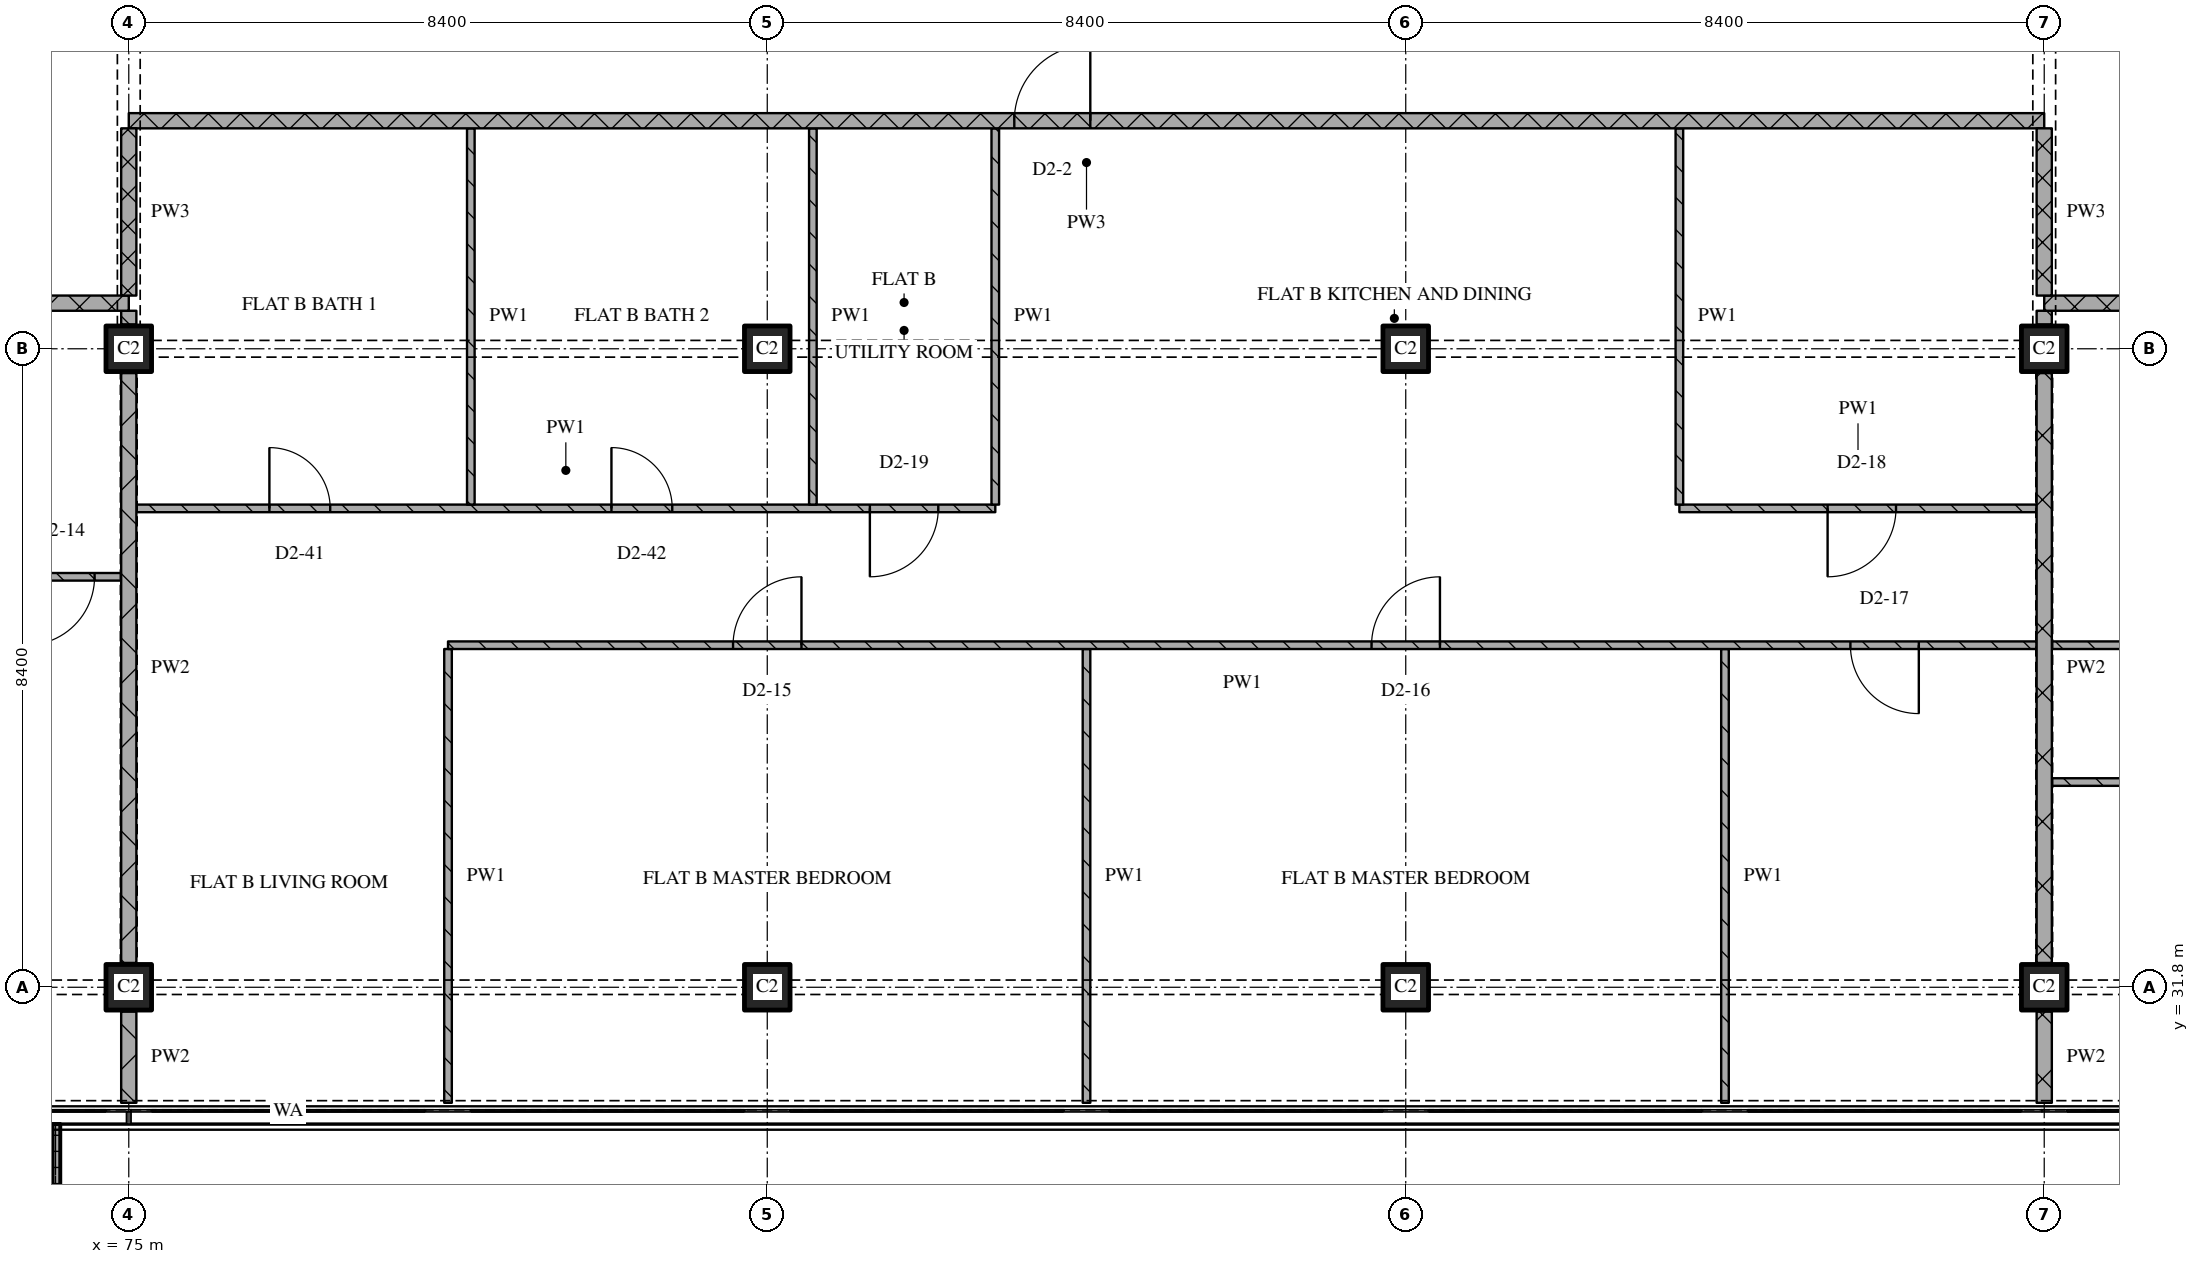
"""IFC4 building model, lengths in metres.
Left out: names, types, materials, properties, quantities, classifications, styles, units other than length and angle.
Written with IfcOpenShell. Run it as: python <this file> out.ifc"""

import sys

from ifc_helpers import new_model, si_unit, direction, frame, frame_2d, origin, origin_2d, place, context, subcontext, project, spatial, polyline, rectangle, outline, extrude, element, fill, save


model = new_model("IFC4")
c1 = context("Model", 3, precision=1e-05, world=origin(), true_north=direction((0.0, 1.0)))
c2 = subcontext(c1, "Body", "Model", "MODEL_VIEW")
j1 = project(units=[si_unit("LENGTHUNIT", "METRE"), si_unit("PLANEANGLEUNIT", "RADIAN")], contexts=[c1])
p1 = place(None, origin())
s1 = spatial("IfcSite", under=j1, at=p1, CompositionType="ELEMENT")
p2 = place(p1, origin())
s2 = spatial("IfcBuilding", under=s1, at=p2, CompositionType="ELEMENT")
p3 = place(p2, frame((0.0, 0.0, 219.9)))
s3 = spatial("IfcBuildingStorey", under=s2, at=p3, CompositionType="ELEMENT", Elevation=219.9)
for number, where, z_axis, x_axis in (
    (1, (75.0, 31.8, 0.0), (0.0, 0.0, 1.0), (1.0, 0.0, 0.0)),
    (2, (75.0, 40.2, 0.0), (0.0, 0.0, 1.0), (1.0, 0.0, 0.0)),
    (3, (83.4, 31.8, 0.0), (0.0, 0.0, 1.0), (1.0, 0.0, 0.0)),
    (4, (83.4, 40.2, 0.0), (0.0, 0.0, 1.0), (1.0, 0.0, 0.0)),
    (5, (91.8, 31.8, 0.0), (0.0, 0.0, 1.0), (1.0, 0.0, 0.0)),
    (6, (91.8, 40.2, 0.0), (0.0, 0.0, 1.0), (1.0, 0.0, 0.0)),
    (7, (100.2, 31.8, 0.0), (0.0, 0.0, 1.0), (1.0, 0.0, 0.0)),
    (8, (100.2, 40.2, 0.0), (0.0, 0.0, 1.0), (1.0, 0.0, 0.0)),
):
    element("IfcColumn", number, at=place(p3, frame(where, z_axis=z_axis, x_axis=x_axis)), inside=s3, PredefinedType="COLUMN", context=c2, shape_type="SweptSolid", body=[
        extrude(rectangle(XDim=0.6, YDim=0.6, at=origin_2d()), origin(), (0.0, 0.0, 1.0), 3.6),
    ])
p4 = place(p3, origin())
e9 = element("IfcWall", 9, at=p4, inside=s3, PredefinedType="SOLIDWALL", context=c2, shape_type="SweptSolid", body=[
    extrude(outline(polyline([(71.7, 30.0), (71.8, 30.0), (71.8, 28.5), (74.0, 28.5), (74.0, 30.0), (74.1, 30.0), (74.1, 28.4), (71.7, 28.4), (71.7, 30.0)])), origin(), (0.0, 0.0, 1.0), 1.0),
])
p5 = place(p3, frame((100.3, 34.5, 0.0), z_axis=(0.0, 0.0, 1.0), x_axis=(1.0, 0.0, 0.0)))
e10 = element("IfcWall", 10, at=p5, inside=s3, PredefinedType="PARTITIONING", context=c2, shape_type="SweptSolid", body=[
    extrude(rectangle(XDim=8.3, YDim=0.1, at=frame_2d((4.15, 0.0))), origin(), (0.0, 0.0, 1.0), 3.32),
])
p6 = place(p3, frame((64.2, 37.2, 0.0), z_axis=(0.0, 0.0, 1.0), x_axis=(1.0, 0.0, 0.0)))
e11 = element("IfcWall", 11, at=p6, inside=s3, PredefinedType="PARTITIONING", context=c2, shape_type="SweptSolid", body=[
    extrude(rectangle(XDim=10.7, YDim=0.1, at=frame_2d((5.35, 0.0))), origin(), (0.0, 0.0, 1.0), 3.32),
])
p7 = place(p6, frame((6.35, 0.0, 0.0)))
e12 = element("IfcOpeningElement", 12, at=p7, cuts=e11, PredefinedType="OPENING", context=c2, shape_type="SweptSolid", body=[
    extrude(rectangle(XDim=0.8, YDim=2.1, at=frame_2d((0.4, 1.05))), frame((0.0, 0.06, 0.0), z_axis=(0.0, -1.0, 0.0), x_axis=(1.0, 0.0, 0.0)), (0.0, 0.0, 1.0), 0.12),
])
p8 = place(p6, frame((9.45, 0.0, 0.0)))
e13 = element("IfcOpeningElement", 13, at=p8, cuts=e11, PredefinedType="OPENING", context=c2, shape_type="SweptSolid", body=[
    extrude(rectangle(XDim=0.9, YDim=2.1, at=frame_2d((0.45, 1.05))), frame((0.0, 0.06, 0.0), z_axis=(0.0, -1.0, 0.0), x_axis=(1.0, 0.0, 0.0)), (0.0, 0.0, 1.0), 0.12),
])
p9 = place(p3, frame((75.1, 38.1, 0.0), z_axis=(0.0, 0.0, 1.0), x_axis=(1.0, 0.0, 0.0)))
e14 = element("IfcWall", 14, at=p9, inside=s3, PredefinedType="PARTITIONING", context=c2, shape_type="SweptSolid", body=[
    extrude(rectangle(XDim=11.3, YDim=0.1, at=frame_2d((5.65, 0.0))), origin(), (0.0, 0.0, 1.0), 3.32),
])
p10 = place(p9, frame((1.75, 0.0, 0.0)))
e15 = element("IfcOpeningElement", 15, at=p10, cuts=e14, PredefinedType="OPENING", context=c2, shape_type="SweptSolid", body=[
    extrude(rectangle(XDim=0.8, YDim=2.1, at=frame_2d((0.4, 1.05))), frame((0.0, 0.06, 0.0), z_axis=(0.0, -1.0, 0.0), x_axis=(1.0, 0.0, 0.0)), (0.0, 0.0, 1.0), 0.12),
])
p11 = place(p9, frame((6.25, 0.0, 0.0)))
e16 = element("IfcOpeningElement", 16, at=p11, cuts=e14, PredefinedType="OPENING", context=c2, shape_type="SweptSolid", body=[
    extrude(rectangle(XDim=0.8, YDim=2.1, at=frame_2d((0.4, 1.05))), frame((0.0, 0.06, 0.0), z_axis=(0.0, -1.0, 0.0), x_axis=(1.0, 0.0, 0.0)), (0.0, 0.0, 1.0), 0.12),
])
p12 = place(p9, frame((9.65, 0.0, 0.0)))
e17 = element("IfcOpeningElement", 17, at=p12, cuts=e14, PredefinedType="OPENING", context=c2, shape_type="SweptSolid", body=[
    extrude(rectangle(XDim=0.9, YDim=2.1, at=frame_2d((0.45, 1.05))), frame((0.0, 0.06, 0.0), z_axis=(0.0, -1.0, 0.0), x_axis=(1.0, 0.0, 0.0)), (0.0, 0.0, 1.0), 0.12),
])
p13 = place(p3, frame((95.4, 38.1, 0.0), z_axis=(0.0, 0.0, 1.0), x_axis=(1.0, 0.0, 0.0)))
e18 = element("IfcWall", 18, at=p13, inside=s3, PredefinedType="PARTITIONING", context=c2, shape_type="SweptSolid", body=[
    extrude(rectangle(XDim=4.7, YDim=0.1, at=frame_2d((2.35, 0.0))), origin(), (0.0, 0.0, 1.0), 3.32),
])
p14 = place(p13, frame((1.95, 0.0, 0.0)))
e19 = element("IfcOpeningElement", 19, at=p14, cuts=e18, PredefinedType="OPENING", context=c2, shape_type="SweptSolid", body=[
    extrude(rectangle(XDim=0.9, YDim=2.1, at=frame_2d((0.45, 1.05))), frame((0.0, 0.06, 0.0), z_axis=(0.0, -1.0, 0.0), x_axis=(1.0, 0.0, 0.0)), (0.0, 0.0, 1.0), 0.12),
])
p15 = place(p3, frame((75.0, 40.8, 0.0), z_axis=(0.0, 0.0, 1.0), x_axis=(-1.0, 0.0, 0.0)))
e20 = element("IfcWall", 20, at=p15, inside=s3, PredefinedType="PARTITIONING", context=c2, shape_type="SweptSolid", body=[
    extrude(rectangle(XDim=24.38, YDim=0.2, at=frame_2d((12.19, 0.0))), origin(), (0.0, 0.0, 1.0), 3.32),
])
p16 = place(p15, frame((11.05, 0.0, 0.0)))
e21 = element("IfcOpeningElement", 21, at=p16, cuts=e20, PredefinedType="OPENING", context=c2, shape_type="SweptSolid", body=[
    extrude(rectangle(XDim=1.0, YDim=2.1, at=frame_2d((0.5, 1.05))), frame((0.0, 0.11, 0.0), z_axis=(0.0, -1.0, 0.0), x_axis=(1.0, 0.0, 0.0)), (0.0, 0.0, 1.0), 0.22),
])
p17 = place(p3, frame((124.58, 40.8, 0.0), z_axis=(0.0, 0.0, 1.0), x_axis=(-1.0, 0.0, 0.0)))
e22 = element("IfcWall", 22, at=p17, inside=s3, PredefinedType="PARTITIONING", context=c2, shape_type="SweptSolid", body=[
    extrude(rectangle(XDim=24.38, YDim=0.2, at=frame_2d((12.19, 0.0))), origin(), (0.0, 0.0, 1.0), 3.32),
])
p18 = place(p17, frame((14.43, 0.0, 0.0)))
e23 = element("IfcOpeningElement", 23, at=p18, cuts=e22, PredefinedType="OPENING", context=c2, shape_type="SweptSolid", body=[
    extrude(rectangle(XDim=1.0, YDim=2.1, at=frame_2d((0.5, 1.05))), frame((0.0, 0.11, 0.0), z_axis=(0.0, -1.0, 0.0), x_axis=(1.0, 0.0, 0.0)), (0.0, 0.0, 1.0), 0.22),
])
p19 = place(p3, frame((100.2, 43.2, 0.0), z_axis=(0.0, 0.0, 1.0), x_axis=(-1.0, 0.0, 0.0)))
e24 = element("IfcWall", 24, at=p19, inside=s3, PredefinedType="PARTITIONING", context=c2, shape_type="SweptSolid", body=[
    extrude(rectangle(XDim=25.2, YDim=0.2, at=frame_2d((12.6, 0.0))), origin(), (0.0, 0.0, 1.0), 3.32),
])
p20 = place(p19, frame((12.55, 0.0, 0.0)))
e25 = element("IfcOpeningElement", 25, at=p20, cuts=e24, PredefinedType="OPENING", context=c2, shape_type="SweptSolid", body=[
    extrude(rectangle(XDim=1.0, YDim=2.1, at=frame_2d((0.5, 1.05))), frame((0.0, 0.11, 0.0), z_axis=(0.0, -1.0, 0.0), x_axis=(1.0, 0.0, 0.0)), (0.0, 0.0, 1.0), 0.22),
])
p21 = place(p3, frame((75.0, 43.1, 0.0), z_axis=(0.0, 0.0, 1.0), x_axis=(0.0, -1.0, 0.0)))
e26 = element("IfcWall", 26, at=p21, inside=s3, PredefinedType="PARTITIONING", context=c2, shape_type="SweptSolid", body=[
    extrude(rectangle(XDim=2.2, YDim=0.2, at=frame_2d((1.1, 0.0))), origin(), (0.0, 0.0, 1.0), 2.53),
])
p22 = place(p3, frame((75.0, 31.48, 0.0), z_axis=(0.0, 0.0, 1.0), x_axis=(0.0, -1.0, 0.0)))
e27 = element("IfcWall", 27, at=p22, inside=s3, PredefinedType="PARTITIONING", context=c2, shape_type="SweptSolid", body=[
    extrude(rectangle(XDim=1.2, YDim=0.2, at=frame_2d((0.6, 0.0))), origin(), (0.0, 0.0, 1.0), 3.32),
])
p23 = place(p3, frame((75.0, 39.88, 0.0), z_axis=(0.0, 0.0, 1.0), x_axis=(0.0, -1.0, 0.0)))
e28 = element("IfcWall", 28, at=p23, inside=s3, PredefinedType="PARTITIONING", context=c2, shape_type="SweptSolid", body=[
    extrude(rectangle(XDim=7.76, YDim=0.2, at=frame_2d((3.88, 0.0))), origin(), (0.0, 0.0, 1.0), 2.72),
])
p24 = place(p3, frame((75.0, 40.7, 0.0), z_axis=(0.0, 0.0, 1.0), x_axis=(0.0, -1.0, 0.0)))
e29 = element("IfcWall", 29, at=p24, inside=s3, PredefinedType="PARTITIONING", context=c2, shape_type="SweptSolid", body=[
    extrude(rectangle(XDim=0.18, YDim=0.2, at=frame_2d((0.09, 0.0))), origin(), (0.0, 0.0, 1.0), 3.32),
])
p25 = place(p3, frame((79.2, 36.25, 0.0), z_axis=(0.0, 0.0, 1.0), x_axis=(0.0, -1.0, 0.0)))
e30 = element("IfcWall", 30, at=p25, inside=s3, PredefinedType="PARTITIONING", context=c2, shape_type="SweptSolid", body=[
    extrude(rectangle(XDim=5.97, YDim=0.1, at=frame_2d((2.985, 0.0))), origin(), (0.0, 0.0, 1.0), 3.32),
])
for number, where, z_axis, x_axis in (
    (31, (79.5, 43.1, 0.0), (0.0, 0.0, 1.0), (0.0, -1.0, 0.0)),
    (32, (84.0, 43.1, 0.0), (0.0, 0.0, 1.0), (0.0, -1.0, 0.0)),
    (33, (86.4, 43.1, 0.0), (0.0, 0.0, 1.0), (0.0, -1.0, 0.0)),
):
    element("IfcWall", number, at=place(p3, frame(where, z_axis=z_axis, x_axis=x_axis)), inside=s3, PredefinedType="PARTITIONING", context=c2, shape_type="SweptSolid", body=[
        extrude(rectangle(XDim=4.95, YDim=0.1, at=frame_2d((2.475, 0.0))), origin(), (0.0, 0.0, 1.0), 3.32),
    ])
p26 = place(p3, frame((87.6, 36.25, 0.0), z_axis=(0.0, 0.0, 1.0), x_axis=(0.0, -1.0, 0.0)))
e34 = element("IfcWall", 34, at=p26, inside=s3, PredefinedType="PARTITIONING", context=c2, shape_type="SweptSolid", body=[
    extrude(rectangle(XDim=5.97, YDim=0.1, at=frame_2d((2.985, 0.0))), origin(), (0.0, 0.0, 1.0), 3.32),
])
p27 = place(p3, frame((95.4, 43.1, 0.0), z_axis=(0.0, 0.0, 1.0), x_axis=(0.0, -1.0, 0.0)))
e35 = element("IfcWall", 35, at=p27, inside=s3, PredefinedType="PARTITIONING", context=c2, shape_type="SweptSolid", body=[
    extrude(rectangle(XDim=4.95, YDim=0.1, at=frame_2d((2.475, 0.0))), origin(), (0.0, 0.0, 1.0), 3.32),
])
p28 = place(p3, frame((96.0, 36.25, 0.0), z_axis=(0.0, 0.0, 1.0), x_axis=(0.0, -1.0, 0.0)))
e36 = element("IfcWall", 36, at=p28, inside=s3, PredefinedType="PARTITIONING", context=c2, shape_type="SweptSolid", body=[
    extrude(rectangle(XDim=5.97, YDim=0.1, at=frame_2d((2.985, 0.0))), origin(), (0.0, 0.0, 1.0), 3.32),
])
p29 = place(p3, frame((100.2, 43.1, 0.0), z_axis=(0.0, 0.0, 1.0), x_axis=(0.0, -1.0, 0.0)))
e37 = element("IfcWall", 37, at=p29, inside=s3, PredefinedType="PARTITIONING", context=c2, shape_type="SweptSolid", body=[
    extrude(rectangle(XDim=2.2, YDim=0.2, at=frame_2d((1.1, 0.0))), origin(), (0.0, 0.0, 1.0), 2.53),
])
p30 = place(p3, frame((100.2, 31.48, 0.0), z_axis=(0.0, 0.0, 1.0), x_axis=(0.0, -1.0, 0.0)))
e38 = element("IfcWall", 38, at=p30, inside=s3, PredefinedType="PARTITIONING", context=c2, shape_type="SweptSolid", body=[
    extrude(rectangle(XDim=1.2, YDim=0.2, at=frame_2d((0.6, 0.0))), origin(), (0.0, 0.0, 1.0), 3.32),
])
p31 = place(p3, frame((100.2, 39.88, 0.0), z_axis=(0.0, 0.0, 1.0), x_axis=(0.0, -1.0, 0.0)))
e39 = element("IfcWall", 39, at=p31, inside=s3, PredefinedType="PARTITIONING", context=c2, shape_type="SweptSolid", body=[
    extrude(rectangle(XDim=7.76, YDim=0.2, at=frame_2d((3.88, 0.0))), origin(), (0.0, 0.0, 1.0), 2.72),
])
p32 = place(p3, frame((100.2, 40.7, 0.0), z_axis=(0.0, 0.0, 1.0), x_axis=(0.0, -1.0, 0.0)))
e40 = element("IfcWall", 40, at=p32, inside=s3, PredefinedType="PARTITIONING", context=c2, shape_type="SweptSolid", body=[
    extrude(rectangle(XDim=0.18, YDim=0.2, at=frame_2d((0.09, 0.0))), origin(), (0.0, 0.0, 1.0), 3.32),
])
p33 = place(p3, frame((100.1, 36.3, 0.0), z_axis=(0.0, 0.0, 1.0), x_axis=(-1.0, 0.0, 0.0)))
e41 = element("IfcWall", 41, at=p33, inside=s3, PredefinedType="PARTITIONING", context=c2, shape_type="SweptSolid", body=[
    extrude(rectangle(XDim=20.9, YDim=0.1, at=frame_2d((10.45, 0.0))), origin(), (0.0, 0.0, 1.0), 3.32),
])
p34 = place(p33, frame((1.55, 0.0, 0.0)))
e42 = element("IfcOpeningElement", 42, at=p34, cuts=e41, PredefinedType="OPENING", context=c2, shape_type="SweptSolid", body=[
    extrude(rectangle(XDim=0.9, YDim=2.1, at=frame_2d((0.45, 1.05))), frame((0.0, 0.06, 0.0), z_axis=(0.0, -1.0, 0.0), x_axis=(1.0, 0.0, 0.0)), (0.0, 0.0, 1.0), 0.12),
])
p35 = place(p33, frame((7.85, 0.0, 0.0)))
e43 = element("IfcOpeningElement", 43, at=p35, cuts=e41, PredefinedType="OPENING", context=c2, shape_type="SweptSolid", body=[
    extrude(rectangle(XDim=0.9, YDim=2.1, at=frame_2d((0.45, 1.05))), frame((0.0, 0.06, 0.0), z_axis=(0.0, -1.0, 0.0), x_axis=(1.0, 0.0, 0.0)), (0.0, 0.0, 1.0), 0.12),
])
p36 = place(p33, frame((16.25, 0.0, 0.0)))
e44 = element("IfcOpeningElement", 44, at=p36, cuts=e41, PredefinedType="OPENING", context=c2, shape_type="SweptSolid", body=[
    extrude(rectangle(XDim=0.9, YDim=2.1, at=frame_2d((0.45, 1.05))), frame((0.0, 0.06, 0.0), z_axis=(0.0, -1.0, 0.0), x_axis=(1.0, 0.0, 0.0)), (0.0, 0.0, 1.0), 0.12),
])
p37 = place(p3, frame((100.3, 36.3, 0.0), z_axis=(0.0, 0.0, 1.0), x_axis=(1.0, 0.0, 0.0)))
e45 = element("IfcWall", 45, at=p37, inside=s3, PredefinedType="PARTITIONING", context=c2, shape_type="SweptSolid", body=[
    extrude(rectangle(XDim=8.6, YDim=0.1, at=frame_2d((4.3, 0.0))), origin(), (0.0, 0.0, 1.0), 3.32),
])
p38 = place(p37, frame((1.75, 0.0, 0.0)))
e46 = element("IfcOpeningElement", 46, at=p38, cuts=e45, PredefinedType="OPENING", context=c2, shape_type="SweptSolid", body=[
    extrude(rectangle(XDim=0.8, YDim=2.1, at=frame_2d((0.4, 1.05))), frame((0.0, 0.06, 0.0), z_axis=(0.0, -1.0, 0.0), x_axis=(1.0, 0.0, 0.0)), (0.0, 0.0, 1.0), 0.12),
])
p39 = place(p8, origin())
e47 = element("IfcDoor", 47, at=p39, inside=s3, OperationType="SINGLE_SWING_RIGHT", PredefinedType="DOOR", context=c2, shape_type="SweptSolid", body=[
    extrude(rectangle(XDim=0.9, YDim=2.1, at=frame_2d((0.45, 1.05))), frame((0.0, 0.025, 0.0), z_axis=(0.0, -1.0, 0.0), x_axis=(1.0, 0.0, 0.0)), (0.0, 0.0, 1.0), 0.05),
])
fill(e13, e47)
p40 = place(p10, origin())
e48 = element("IfcDoor", 48, at=p40, inside=s3, OperationType="SINGLE_SWING_LEFT", PredefinedType="DOOR", context=c2, shape_type="SweptSolid", body=[
    extrude(rectangle(XDim=0.8, YDim=2.1, at=frame_2d((0.4, 1.05))), frame((0.0, 0.025, 0.0), z_axis=(0.0, -1.0, 0.0), x_axis=(1.0, 0.0, 0.0)), (0.0, 0.0, 1.0), 0.05),
])
fill(e15, e48)
p41 = place(p11, origin())
e49 = element("IfcDoor", 49, at=p41, inside=s3, OperationType="SINGLE_SWING_LEFT", PredefinedType="DOOR", context=c2, shape_type="SweptSolid", body=[
    extrude(rectangle(XDim=0.8, YDim=2.1, at=frame_2d((0.4, 1.05))), frame((0.0, 0.025, 0.0), z_axis=(0.0, -1.0, 0.0), x_axis=(1.0, 0.0, 0.0)), (0.0, 0.0, 1.0), 0.05),
])
fill(e16, e49)
p42 = place(p12, origin())
e50 = element("IfcDoor", 50, at=p42, inside=s3, OperationType="SINGLE_SWING_RIGHT", PredefinedType="DOOR", context=c2, shape_type="SweptSolid", body=[
    extrude(rectangle(XDim=0.9, YDim=2.1, at=frame_2d((0.45, 1.05))), frame((0.0, 0.025, 0.0), z_axis=(0.0, -1.0, 0.0), x_axis=(1.0, 0.0, 0.0)), (0.0, 0.0, 1.0), 0.05),
])
fill(e17, e50)
p43 = place(p14, origin())
e51 = element("IfcDoor", 51, at=p43, inside=s3, OperationType="SINGLE_SWING_RIGHT", PredefinedType="DOOR", context=c2, shape_type="SweptSolid", body=[
    extrude(rectangle(XDim=0.9, YDim=2.1, at=frame_2d((0.45, 1.05))), frame((0.0, 0.025, 0.0), z_axis=(0.0, -1.0, 0.0), x_axis=(1.0, 0.0, 0.0)), (0.0, 0.0, 1.0), 0.05),
])
fill(e19, e51)
p44 = place(p20, origin())
e52 = element("IfcDoor", 52, at=p44, inside=s3, OperationType="SINGLE_SWING_RIGHT", PredefinedType="DOOR", context=c2, shape_type="SweptSolid", body=[
    extrude(rectangle(XDim=1.0, YDim=2.1, at=frame_2d((0.5, 1.05))), frame((0.0, 0.025, 0.0), z_axis=(0.0, -1.0, 0.0), x_axis=(1.0, 0.0, 0.0)), (0.0, 0.0, 1.0), 0.05),
])
fill(e25, e52)
p45 = place(p34, origin())
e53 = element("IfcDoor", 53, at=p45, inside=s3, OperationType="SINGLE_SWING_LEFT", PredefinedType="DOOR", context=c2, shape_type="SweptSolid", body=[
    extrude(rectangle(XDim=0.9, YDim=2.1, at=frame_2d((0.45, 1.05))), frame((0.0, 0.025, 0.0), z_axis=(0.0, -1.0, 0.0), x_axis=(1.0, 0.0, 0.0)), (0.0, 0.0, 1.0), 0.05),
])
fill(e42, e53)
p46 = place(p35, origin())
e54 = element("IfcDoor", 54, at=p46, inside=s3, OperationType="SINGLE_SWING_RIGHT", PredefinedType="DOOR", context=c2, shape_type="SweptSolid", body=[
    extrude(rectangle(XDim=0.9, YDim=2.1, at=frame_2d((0.45, 1.05))), frame((0.0, 0.025, 0.0), z_axis=(0.0, -1.0, 0.0), x_axis=(1.0, 0.0, 0.0)), (0.0, 0.0, 1.0), 0.05),
])
fill(e43, e54)
p47 = place(p36, origin())
e55 = element("IfcDoor", 55, at=p47, inside=s3, OperationType="SINGLE_SWING_RIGHT", PredefinedType="DOOR", context=c2, shape_type="SweptSolid", body=[
    extrude(rectangle(XDim=0.9, YDim=2.1, at=frame_2d((0.45, 1.05))), frame((0.0, 0.025, 0.0), z_axis=(0.0, -1.0, 0.0), x_axis=(1.0, 0.0, 0.0)), (0.0, 0.0, 1.0), 0.05),
])
fill(e44, e55)
save(model, sys.argv[1])
